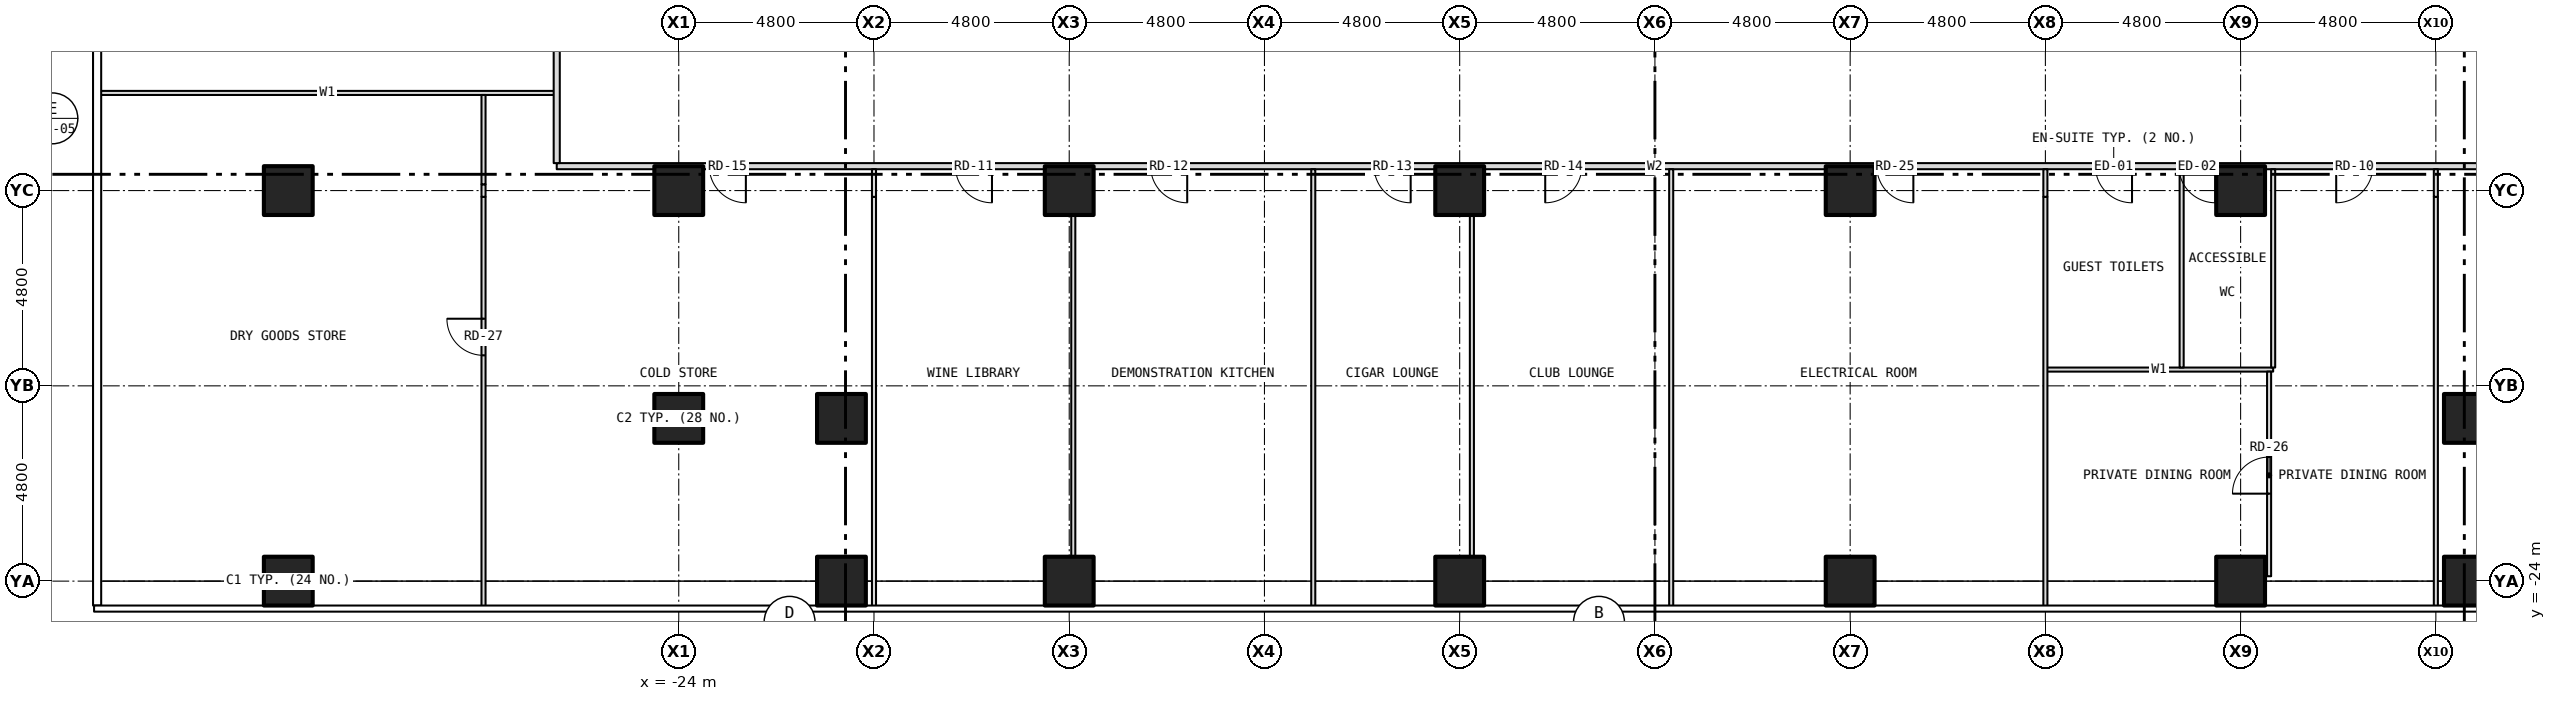
"""IFC4 building model, lengths in metres.
Left out: names, types, materials, properties, quantities, classifications, styles, units other than length and angle.
Written with IfcOpenShell. Run it as: python <this file> out.ifc"""

import sys

from ifc_helpers import new_model, si_unit, direction, frame, frame_2d, origin, origin_2d, place, context, subcontext, project, spatial, rectangle, hollow_rectangle, extrude, element, fill, save


model = new_model("IFC4")
c1 = context("Model", 3, precision=1e-05, world=origin(), true_north=direction((0.0, 1.0)))
c2 = subcontext(c1, "Body", "Model", "MODEL_VIEW")
j1 = project(units=[si_unit("LENGTHUNIT", "METRE"), si_unit("PLANEANGLEUNIT", "RADIAN")], contexts=[c1])
p1 = place(None, origin())
s1 = spatial("IfcSite", under=j1, at=p1, CompositionType="ELEMENT")
p2 = place(p1, origin())
s2 = spatial("IfcBuilding", under=s1, at=p2, CompositionType="ELEMENT")
p3 = place(p2, frame((0.0, 0.0, 29.0)))
s3 = spatial("IfcBuildingStorey", under=s2, at=p3, CompositionType="ELEMENT", Elevation=29.0)
for number, where, z_axis, x_axis in (
    (1, (-33.6, -24.0, -0.2), (0.0, 0.0, 1.0), (1.0, 0.0, 0.0)),
    (2, (-33.6, -14.4, -0.2), (0.0, 0.0, 1.0), (1.0, 0.0, 0.0)),
    (3, (-20.0, -24.0, -0.2), (0.0, 0.0, 1.0), (1.0, 0.0, 0.0)),
    (4, (-14.4, -24.0, -0.2), (0.0, 0.0, 1.0), (1.0, 0.0, 0.0)),
    (5, (-4.8, -24.0, -0.2), (0.0, 0.0, 1.0), (1.0, 0.0, 0.0)),
    (6, (4.8, -24.0, -0.2), (0.0, 0.0, 1.0), (1.0, 0.0, 0.0)),
    (7, (14.4, -24.0, -0.2), (0.0, 0.0, 1.0), (1.0, 0.0, 0.0)),
    (8, (20.0, -24.0, -0.2), (0.0, 0.0, 1.0), (1.0, 0.0, 0.0)),
    (9, (-24.0, -20.0, -0.2), (0.0, 0.0, 1.0), (1.0, 0.0, 0.0)),
    (10, (-24.0, -14.4, -0.2), (0.0, 0.0, 1.0), (1.0, 0.0, 0.0)),
    (11, (-20.0, -20.0, -0.2), (0.0, 0.0, 1.0), (1.0, 0.0, 0.0)),
    (12, (-14.4, -14.4, -0.2), (0.0, 0.0, 1.0), (1.0, 0.0, 0.0)),
    (13, (-4.8, -14.4, -0.2), (0.0, 0.0, 1.0), (1.0, 0.0, 0.0)),
    (14, (4.8, -14.4, -0.2), (0.0, 0.0, 1.0), (1.0, 0.0, 0.0)),
    (15, (14.4, -14.4, -0.2), (0.0, 0.0, 1.0), (1.0, 0.0, 0.0)),
    (16, (20.0, -20.0, -0.2), (0.0, 0.0, 1.0), (1.0, 0.0, 0.0)),
):
    element("IfcColumn", number, at=place(p3, frame(where, z_axis=z_axis, x_axis=x_axis)), inside=s3, PredefinedType="COLUMN", context=c2, shape_type="SweptSolid", body=[
        extrude(hollow_rectangle(XDim=1.2, YDim=1.2, WallThickness=0.07, at=origin_2d()), origin(), (0.0, 0.0, 1.0), 4.4),
    ])
p4 = place(p3, frame((9.6, -18.8, 0.0), z_axis=(0.0, 0.0, 1.0), x_axis=(1.0, 0.0, 0.0)))
e17 = element("IfcWall", 17, at=p4, inside=s3, PredefinedType="PARTITIONING", context=c2, shape_type="SweptSolid", body=[
    extrude(rectangle(XDim=5.6, YDim=0.1, at=frame_2d((2.8, 0.0))), origin(), (0.0, 0.0, 1.0), 4.2),
])
p5 = place(p3, frame((-27.0, -13.8, 0.0), z_axis=(0.0, 0.0, 1.0), x_axis=(1.0, 0.0, 0.0)))
e18 = element("IfcWall", 18, at=p5, inside=s3, PredefinedType="PARTITIONING", context=c2, shape_type="SweptSolid", body=[
    extrude(rectangle(XDim=54.0, YDim=0.15, at=frame_2d((27.0, 0.0))), origin(), (0.0, 0.0, 1.0), 4.2),
])
p6 = place(p5, frame((37.83, 0.0, 0.0)))
e19 = element("IfcOpeningElement", 19, at=p6, cuts=e18, PredefinedType="OPENING", context=c2, shape_type="SweptSolid", body=[
    extrude(rectangle(XDim=0.9, YDim=2.1, at=frame_2d((0.45, 1.05))), frame((0.0, 0.087, 0.0), z_axis=(0.0, -1.0, 0.0), x_axis=(1.0, 0.0, 0.0)), (0.0, 0.0, 1.0), 0.174),
])
p7 = place(p5, frame((39.88, 0.0, 0.0)))
e20 = element("IfcOpeningElement", 20, at=p7, cuts=e18, PredefinedType="OPENING", context=c2, shape_type="SweptSolid", body=[
    extrude(rectangle(XDim=0.9, YDim=2.1, at=frame_2d((0.45, 1.05))), frame((0.0, 0.087, 0.0), z_axis=(0.0, -1.0, 0.0), x_axis=(1.0, 0.0, 0.0)), (0.0, 0.0, 1.0), 0.174),
])
p8 = place(p5, frame((43.75, 0.0, 0.0)))
e21 = element("IfcOpeningElement", 21, at=p8, cuts=e18, PredefinedType="OPENING", context=c2, shape_type="SweptSolid", body=[
    extrude(rectangle(XDim=0.9, YDim=2.1, at=frame_2d((0.45, 1.05))), frame((0.0, 0.087, 0.0), z_axis=(0.0, -1.0, 0.0), x_axis=(1.0, 0.0, 0.0)), (0.0, 0.0, 1.0), 0.174),
])
p9 = place(p5, frame((9.801, 0.0, 0.0)))
e22 = element("IfcOpeningElement", 22, at=p9, cuts=e18, PredefinedType="OPENING", context=c2, shape_type="SweptSolid", body=[
    extrude(rectangle(XDim=0.9, YDim=2.1, at=frame_2d((0.45, 1.05))), frame((0.0, 0.087, 0.0), z_axis=(0.0, -1.0, 0.0), x_axis=(1.0, 0.0, 0.0)), (0.0, 0.0, 1.0), 0.174),
])
p10 = place(p5, frame((14.601, 0.0, 0.0)))
e23 = element("IfcOpeningElement", 23, at=p10, cuts=e18, PredefinedType="OPENING", context=c2, shape_type="SweptSolid", body=[
    extrude(rectangle(XDim=0.9, YDim=2.1, at=frame_2d((0.45, 1.05))), frame((0.0, 0.087, 0.0), z_axis=(0.0, -1.0, 0.0), x_axis=(1.0, 0.0, 0.0)), (0.0, 0.0, 1.0), 0.174),
])
p11 = place(p5, frame((20.095, 0.0, 0.0)))
e24 = element("IfcOpeningElement", 24, at=p11, cuts=e18, PredefinedType="OPENING", context=c2, shape_type="SweptSolid", body=[
    extrude(rectangle(XDim=0.9, YDim=2.1, at=frame_2d((0.45, 1.05))), frame((0.0, 0.087, 0.0), z_axis=(0.0, -1.0, 0.0), x_axis=(1.0, 0.0, 0.0)), (0.0, 0.0, 1.0), 0.174),
])
p12 = place(p5, frame((24.303, 0.0, 0.0)))
e25 = element("IfcOpeningElement", 25, at=p12, cuts=e18, PredefinedType="OPENING", context=c2, shape_type="SweptSolid", body=[
    extrude(rectangle(XDim=0.9, YDim=2.1, at=frame_2d((0.45, 1.05))), frame((0.0, 0.087, 0.0), z_axis=(0.0, -1.0, 0.0), x_axis=(1.0, 0.0, 0.0)), (0.0, 0.0, 1.0), 0.174),
])
p13 = place(p5, frame((3.75, 0.0, 0.0)))
e26 = element("IfcOpeningElement", 26, at=p13, cuts=e18, PredefinedType="OPENING", context=c2, shape_type="SweptSolid", body=[
    extrude(rectangle(XDim=0.9, YDim=2.1, at=frame_2d((0.45, 1.05))), frame((0.0, 0.087, 0.0), z_axis=(0.0, -1.0, 0.0), x_axis=(1.0, 0.0, 0.0)), (0.0, 0.0, 1.0), 0.174),
])
p14 = place(p5, frame((49.35, 0.0, 0.0)))
e27 = element("IfcOpeningElement", 27, at=p14, cuts=e18, PredefinedType="OPENING", context=c2, shape_type="SweptSolid", body=[
    extrude(rectangle(XDim=0.9, YDim=2.1, at=frame_2d((0.45, 1.05))), frame((0.0, 0.087, 0.0), z_axis=(0.0, -1.0, 0.0), x_axis=(1.0, 0.0, 0.0)), (0.0, 0.0, 1.0), 0.174),
])
p15 = place(p5, frame((32.454, 0.0, 0.0)))
e28 = element("IfcOpeningElement", 28, at=p15, cuts=e18, PredefinedType="OPENING", context=c2, shape_type="SweptSolid", body=[
    extrude(rectangle(XDim=0.9, YDim=2.1, at=frame_2d((0.45, 1.05))), frame((0.0, 0.087, 0.0), z_axis=(0.0, -1.0, 0.0), x_axis=(1.0, 0.0, 0.0)), (0.0, 0.0, 1.0), 0.174),
])
p16 = place(p3, frame((-38.28, -12.0, 0.0), z_axis=(0.0, 0.0, 1.0), x_axis=(1.0, 0.0, 0.0)))
e29 = element("IfcWall", 29, at=p16, inside=s3, PredefinedType="PARTITIONING", context=c2, shape_type="SweptSolid", body=[
    extrude(rectangle(XDim=11.28, YDim=0.1, at=frame_2d((5.64, 0.0))), origin(), (0.0, 0.0, 1.0), 4.2),
])
p17 = place(p3, frame((-28.8, -24.63, 0.0), z_axis=(0.0, 0.0, 1.0), x_axis=(0.0, 1.0, 0.0)))
e30 = element("IfcWall", 30, at=p17, inside=s3, PredefinedType="PARTITIONING", context=c2, shape_type="SweptSolid", body=[
    extrude(rectangle(XDim=10.076, YDim=0.1, at=frame_2d((5.038, 0.0))), origin(), (0.0, 0.0, 1.0), 3.583),
])
p18 = place(p17, frame((6.18, 0.0, 0.0)))
e31 = element("IfcOpeningElement", 31, at=p18, cuts=e30, PredefinedType="OPENING", context=c2, shape_type="SweptSolid", body=[
    extrude(rectangle(XDim=0.9, YDim=2.1, at=frame_2d((0.45, 1.05))), frame((0.0, 0.062, 0.0), z_axis=(0.0, -1.0, 0.0), x_axis=(1.0, 0.0, 0.0)), (0.0, 0.0, 1.0), 0.124),
])
p19 = place(p3, frame((-28.8, -14.554, 0.0), z_axis=(0.0, 0.0, 1.0), x_axis=(0.0, 1.0, 0.0)))
e32 = element("IfcWall", 32, at=p19, inside=s3, PredefinedType="PARTITIONING", context=c2, shape_type="SweptSolid", body=[
    extrude(rectangle(XDim=0.308, YDim=0.1, at=frame_2d((0.154, 0.0))), origin(), (0.0, 0.0, 1.0), 4.2),
])
p20 = place(p3, frame((-28.8, -14.246, 0.0), z_axis=(0.0, 0.0, 1.0), x_axis=(0.0, 1.0, 0.0)))
e33 = element("IfcWall", 33, at=p20, inside=s3, PredefinedType="PARTITIONING", context=c2, shape_type="SweptSolid", body=[
    extrude(rectangle(XDim=2.196, YDim=0.1, at=frame_2d((1.098, 0.0))), origin(), (0.0, 0.0, 1.0), 3.583),
])
p21 = place(p3, frame((-27.0, -13.725, 0.0), z_axis=(0.0, 0.0, 1.0), x_axis=(0.0, 1.0, 0.0)))
e34 = element("IfcWall", 34, at=p21, inside=s3, PredefinedType="PARTITIONING", context=c2, shape_type="SweptSolid", body=[
    extrude(rectangle(XDim=27.45, YDim=0.15, at=frame_2d((13.725, 0.0))), origin(), (0.0, 0.0, 1.0), 4.2),
])
p22 = place(p21, frame((7.275, 0.0, 0.0)))
e35 = element("IfcOpeningElement", 35, at=p22, cuts=e34, PredefinedType="OPENING", context=c2, shape_type="SweptSolid", body=[
    extrude(rectangle(XDim=0.9, YDim=2.1, at=frame_2d((0.45, 1.05))), frame((0.0, 0.087, 0.0), z_axis=(0.0, -1.0, 0.0), x_axis=(1.0, 0.0, 0.0)), (0.0, 0.0, 1.0), 0.174),
])
p23 = place(p21, frame((19.275, 0.0, 0.0)))
e36 = element("IfcOpeningElement", 36, at=p23, cuts=e34, PredefinedType="OPENING", context=c2, shape_type="SweptSolid", body=[
    extrude(rectangle(XDim=0.9, YDim=2.1, at=frame_2d((0.45, 1.05))), frame((0.0, 0.087, 0.0), z_axis=(0.0, -1.0, 0.0), x_axis=(1.0, 0.0, 0.0)), (0.0, 0.0, 1.0), 0.174),
])
p24 = place(p3, frame((-19.2, -24.63, 0.0), z_axis=(0.0, 0.0, 1.0), x_axis=(0.0, 1.0, 0.0)))
e37 = element("IfcWall", 37, at=p24, inside=s3, PredefinedType="PARTITIONING", context=c2, shape_type="SweptSolid", body=[
    extrude(rectangle(XDim=10.076, YDim=0.1, at=frame_2d((5.038, 0.0))), origin(), (0.0, 0.0, 1.0), 3.583),
])
p25 = place(p3, frame((-19.2, -14.554, 0.0), z_axis=(0.0, 0.0, 1.0), x_axis=(0.0, 1.0, 0.0)))
e38 = element("IfcWall", 38, at=p25, inside=s3, PredefinedType="PARTITIONING", context=c2, shape_type="SweptSolid", body=[
    extrude(rectangle(XDim=0.679, YDim=0.1, at=frame_2d((0.339, 0.0))), origin(), (0.0, 0.0, 1.0), 4.2),
])
p26 = place(p3, frame((-14.3, -23.88, 0.0), z_axis=(0.0, 0.0, 1.0), x_axis=(0.0, 1.0, 0.0)))
e39 = element("IfcWall", 39, at=p26, inside=s3, PredefinedType="PARTITIONING", context=c2, shape_type="SweptSolid", body=[
    extrude(rectangle(XDim=0.48, YDim=0.1, at=frame_2d((0.24, 0.0))), origin(), (0.0, 0.0, 1.0), 4.2),
])
p27 = place(p3, frame((-14.3, -23.4, 0.0), z_axis=(0.0, 0.0, 1.0), x_axis=(0.0, 1.0, 0.0)))
e40 = element("IfcWall", 40, at=p27, inside=s3, PredefinedType="PARTITIONING", context=c2, shape_type="SweptSolid", body=[
    extrude(rectangle(XDim=8.4, YDim=0.1, at=frame_2d((4.2, 0.0))), origin(), (0.0, 0.0, 1.0), 3.273),
])
p28 = place(p3, frame((-14.3, -15.0, 0.0), z_axis=(0.0, 0.0, 1.0), x_axis=(0.0, 1.0, 0.0)))
e41 = element("IfcWall", 41, at=p28, inside=s3, PredefinedType="PARTITIONING", context=c2, shape_type="SweptSolid", body=[
    extrude(rectangle(XDim=1.125, YDim=0.1, at=frame_2d((0.562, 0.0))), origin(), (0.0, 0.0, 1.0), 4.2),
])
p29 = place(p3, frame((-8.4, -24.63, 0.0), z_axis=(0.0, 0.0, 1.0), x_axis=(0.0, 1.0, 0.0)))
e42 = element("IfcWall", 42, at=p29, inside=s3, PredefinedType="PARTITIONING", context=c2, shape_type="SweptSolid", body=[
    extrude(rectangle(XDim=10.755, YDim=0.1, at=frame_2d((5.377, 0.0))), origin(), (0.0, 0.0, 1.0), 4.2),
])
p30 = place(p3, frame((-4.5, -23.88, 0.0), z_axis=(0.0, 0.0, 1.0), x_axis=(0.0, 1.0, 0.0)))
e43 = element("IfcWall", 43, at=p30, inside=s3, PredefinedType="PARTITIONING", context=c2, shape_type="SweptSolid", body=[
    extrude(rectangle(XDim=10.005, YDim=0.1, at=frame_2d((5.002, 0.0))), origin(), (0.0, 0.0, 1.0), 4.2),
])
p31 = place(p3, frame((0.4, -24.63, 0.0), z_axis=(0.0, 0.0, 1.0), x_axis=(0.0, 1.0, 0.0)))
e44 = element("IfcWall", 44, at=p31, inside=s3, PredefinedType="PARTITIONING", context=c2, shape_type="SweptSolid", body=[
    extrude(rectangle(XDim=10.755, YDim=0.1, at=frame_2d((5.377, 0.0))), origin(), (0.0, 0.0, 1.0), 4.2),
])
p32 = place(p3, frame((9.6, -24.63, 0.0), z_axis=(0.0, 0.0, 1.0), x_axis=(0.0, 1.0, 0.0)))
e45 = element("IfcWall", 45, at=p32, inside=s3, PredefinedType="PARTITIONING", context=c2, shape_type="SweptSolid", body=[
    extrude(rectangle(XDim=10.076, YDim=0.1, at=frame_2d((5.038, 0.0))), origin(), (0.0, 0.0, 1.0), 3.583),
])
p33 = place(p3, frame((9.6, -14.554, 0.0), z_axis=(0.0, 0.0, 1.0), x_axis=(0.0, 1.0, 0.0)))
e46 = element("IfcWall", 46, at=p33, inside=s3, PredefinedType="PARTITIONING", context=c2, shape_type="SweptSolid", body=[
    extrude(rectangle(XDim=0.679, YDim=0.1, at=frame_2d((0.339, 0.0))), origin(), (0.0, 0.0, 1.0), 4.2),
])
p34 = place(p3, frame((12.95, -18.75, 0.0), z_axis=(0.0, 0.0, 1.0), x_axis=(0.0, 1.0, 0.0)))
e47 = element("IfcWall", 47, at=p34, inside=s3, PredefinedType="PARTITIONING", context=c2, shape_type="SweptSolid", body=[
    extrude(rectangle(XDim=4.875, YDim=0.1, at=frame_2d((2.438, 0.0))), origin(), (0.0, 0.0, 1.0), 4.2),
])
p35 = place(p3, frame((15.1, -23.88, 0.0), z_axis=(0.0, 0.0, 1.0), x_axis=(0.0, 1.0, 0.0)))
e48 = element("IfcWall", 48, at=p35, inside=s3, PredefinedType="PARTITIONING", context=c2, shape_type="SweptSolid", body=[
    extrude(rectangle(XDim=5.03, YDim=0.1, at=frame_2d((2.515, 0.0))), origin(), (0.0, 0.0, 1.0), 4.2),
])
p36 = place(p35, frame((2.03, 0.0, 0.0)))
e49 = element("IfcOpeningElement", 49, at=p36, cuts=e48, PredefinedType="OPENING", context=c2, shape_type="SweptSolid", body=[
    extrude(rectangle(XDim=0.9, YDim=2.1, at=frame_2d((0.45, 1.05))), frame((0.0, 0.062, 0.0), z_axis=(0.0, -1.0, 0.0), x_axis=(1.0, 0.0, 0.0)), (0.0, 0.0, 1.0), 0.124),
])
p37 = place(p3, frame((15.2, -18.75, 0.0), z_axis=(0.0, 0.0, 1.0), x_axis=(0.0, 1.0, 0.0)))
e50 = element("IfcWall", 50, at=p37, inside=s3, PredefinedType="PARTITIONING", context=c2, shape_type="SweptSolid", body=[
    extrude(rectangle(XDim=4.875, YDim=0.1, at=frame_2d((2.438, 0.0))), origin(), (0.0, 0.0, 1.0), 4.2),
])
p38 = place(p3, frame((19.2, -24.63, 0.0), z_axis=(0.0, 0.0, 1.0), x_axis=(0.0, 1.0, 0.0)))
e51 = element("IfcWall", 51, at=p38, inside=s3, PredefinedType="PARTITIONING", context=c2, shape_type="SweptSolid", body=[
    extrude(rectangle(XDim=10.076, YDim=0.1, at=frame_2d((5.038, 0.0))), origin(), (0.0, 0.0, 1.0), 3.583),
])
p39 = place(p3, frame((19.2, -14.554, 0.0), z_axis=(0.0, 0.0, 1.0), x_axis=(0.0, 1.0, 0.0)))
e52 = element("IfcWall", 52, at=p39, inside=s3, PredefinedType="PARTITIONING", context=c2, shape_type="SweptSolid", body=[
    extrude(rectangle(XDim=0.679, YDim=0.1, at=frame_2d((0.339, 0.0))), origin(), (0.0, 0.0, 1.0), 4.2),
])
p40 = place(p6, origin())
e53 = element("IfcDoor", 53, at=p40, inside=s3, OperationType="SINGLE_SWING_RIGHT", PredefinedType="DOOR", context=c2, shape_type="SweptSolid", body=[
    extrude(rectangle(XDim=0.9, YDim=2.1, at=frame_2d((0.45, 1.05))), frame((0.0, 0.025, 0.0), z_axis=(0.0, -1.0, 0.0), x_axis=(1.0, 0.0, 0.0)), (0.0, 0.0, 1.0), 0.05),
])
fill(e19, e53)
p41 = place(p7, origin())
e54 = element("IfcDoor", 54, at=p41, inside=s3, OperationType="SINGLE_SWING_RIGHT", PredefinedType="DOOR", context=c2, shape_type="SweptSolid", body=[
    extrude(rectangle(XDim=0.9, YDim=2.1, at=frame_2d((0.45, 1.05))), frame((0.0, 0.025, 0.0), z_axis=(0.0, -1.0, 0.0), x_axis=(1.0, 0.0, 0.0)), (0.0, 0.0, 1.0), 0.05),
])
fill(e20, e54)
p42 = place(p8, origin())
e55 = element("IfcDoor", 55, at=p42, inside=s3, OperationType="SINGLE_SWING_LEFT", PredefinedType="DOOR", context=c2, shape_type="SweptSolid", body=[
    extrude(rectangle(XDim=0.9, YDim=2.1, at=frame_2d((0.45, 1.05))), frame((0.0, 0.025, 0.0), z_axis=(0.0, -1.0, 0.0), x_axis=(1.0, 0.0, 0.0)), (0.0, 0.0, 1.0), 0.05),
])
fill(e21, e55)
p43 = place(p9, origin())
e56 = element("IfcDoor", 56, at=p43, inside=s3, OperationType="SINGLE_SWING_RIGHT", PredefinedType="DOOR", context=c2, shape_type="SweptSolid", body=[
    extrude(rectangle(XDim=0.9, YDim=2.1, at=frame_2d((0.45, 1.05))), frame((0.0, 0.025, 0.0), z_axis=(0.0, -1.0, 0.0), x_axis=(1.0, 0.0, 0.0)), (0.0, 0.0, 1.0), 0.05),
])
fill(e22, e56)
p44 = place(p10, origin())
e57 = element("IfcDoor", 57, at=p44, inside=s3, OperationType="SINGLE_SWING_RIGHT", PredefinedType="DOOR", context=c2, shape_type="SweptSolid", body=[
    extrude(rectangle(XDim=0.9, YDim=2.1, at=frame_2d((0.45, 1.05))), frame((0.0, 0.025, 0.0), z_axis=(0.0, -1.0, 0.0), x_axis=(1.0, 0.0, 0.0)), (0.0, 0.0, 1.0), 0.05),
])
fill(e23, e57)
p45 = place(p11, origin())
e58 = element("IfcDoor", 58, at=p45, inside=s3, OperationType="SINGLE_SWING_RIGHT", PredefinedType="DOOR", context=c2, shape_type="SweptSolid", body=[
    extrude(rectangle(XDim=0.9, YDim=2.1, at=frame_2d((0.45, 1.05))), frame((0.0, 0.025, 0.0), z_axis=(0.0, -1.0, 0.0), x_axis=(1.0, 0.0, 0.0)), (0.0, 0.0, 1.0), 0.05),
])
fill(e24, e58)
p46 = place(p12, origin())
e59 = element("IfcDoor", 59, at=p46, inside=s3, OperationType="SINGLE_SWING_LEFT", PredefinedType="DOOR", context=c2, shape_type="SweptSolid", body=[
    extrude(rectangle(XDim=0.9, YDim=2.1, at=frame_2d((0.45, 1.05))), frame((0.0, 0.025, 0.0), z_axis=(0.0, -1.0, 0.0), x_axis=(1.0, 0.0, 0.0)), (0.0, 0.0, 1.0), 0.05),
])
fill(e25, e59)
p47 = place(p13, origin())
e60 = element("IfcDoor", 60, at=p47, inside=s3, OperationType="SINGLE_SWING_RIGHT", PredefinedType="DOOR", context=c2, shape_type="SweptSolid", body=[
    extrude(rectangle(XDim=0.9, YDim=2.1, at=frame_2d((0.45, 1.05))), frame((0.0, 0.025, 0.0), z_axis=(0.0, -1.0, 0.0), x_axis=(1.0, 0.0, 0.0)), (0.0, 0.0, 1.0), 0.05),
])
fill(e26, e60)
p48 = place(p15, origin())
e61 = element("IfcDoor", 61, at=p48, inside=s3, OperationType="SINGLE_SWING_RIGHT", PredefinedType="DOOR", context=c2, shape_type="SweptSolid", body=[
    extrude(rectangle(XDim=0.9, YDim=2.1, at=frame_2d((0.45, 1.05))), frame((0.0, 0.025, 0.0), z_axis=(0.0, -1.0, 0.0), x_axis=(1.0, 0.0, 0.0)), (0.0, 0.0, 1.0), 0.05),
])
fill(e28, e61)
p49 = place(p36, origin())
e62 = element("IfcDoor", 62, at=p49, inside=s3, OperationType="SINGLE_SWING_LEFT", PredefinedType="DOOR", context=c2, shape_type="SweptSolid", body=[
    extrude(rectangle(XDim=0.9, YDim=2.1, at=frame_2d((0.45, 1.05))), frame((0.0, 0.025, 0.0), z_axis=(0.0, -1.0, 0.0), x_axis=(1.0, 0.0, 0.0)), (0.0, 0.0, 1.0), 0.05),
])
fill(e49, e62)
p50 = place(p18, origin())
e63 = element("IfcDoor", 63, at=p50, inside=s3, OperationType="SINGLE_SWING_RIGHT", PredefinedType="DOOR", context=c2, shape_type="SweptSolid", body=[
    extrude(rectangle(XDim=0.9, YDim=2.1, at=frame_2d((0.45, 1.05))), frame((0.0, 0.025, 0.0), z_axis=(0.0, -1.0, 0.0), x_axis=(1.0, 0.0, 0.0)), (0.0, 0.0, 1.0), 0.05),
])
fill(e31, e63)
save(model, sys.argv[1])
